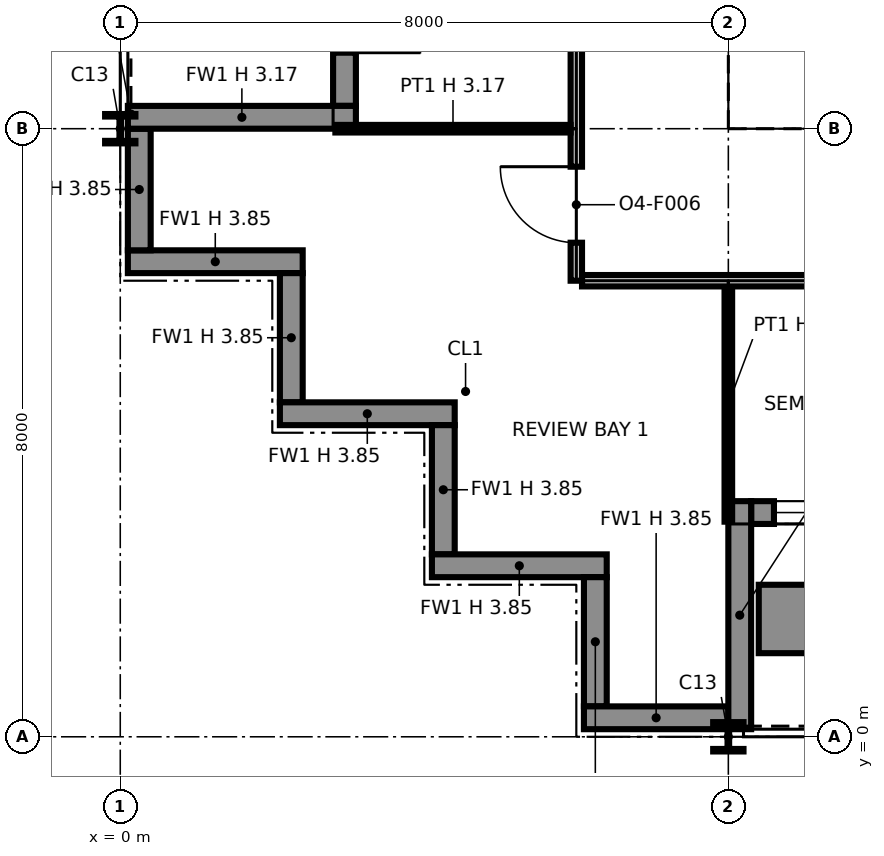
"""IFC4 building model, lengths in metres.
Left out: names, types, materials, properties, quantities, classifications, styles, units other than length and angle.
Written with IfcOpenShell. Run it as: python <this file> out.ifc"""

import sys

from ifc_helpers import new_model, si_unit, direction, frame, frame_2d, origin, origin_2d, place, context, subcontext, project, spatial, polyline, rectangle, i_section, outline, extrude, element, fill, save


model = new_model("IFC4")
c1 = context("Model", 3, precision=1e-05, world=origin(), true_north=direction((0.0, 1.0)))
c2 = subcontext(c1, "Body", "Model", "MODEL_VIEW")
j1 = project(units=[si_unit("LENGTHUNIT", "METRE"), si_unit("PLANEANGLEUNIT", "RADIAN")], contexts=[c1])
p1 = place(None, origin())
s1 = spatial("IfcSite", under=j1, at=p1, CompositionType="ELEMENT")
p2 = place(p1, origin())
s2 = spatial("IfcBuilding", under=s1, at=p2, CompositionType="ELEMENT")
p3 = place(p2, frame((0.0, 0.0, 217.0)))
s3 = spatial("IfcBuildingStorey", under=s2, at=p3, CompositionType="ELEMENT", Elevation=217.0)
for number, where, z_axis, x_axis in (
    (1, (0.0, 8.0, 0.0), (0.0, 0.0, 1.0), (1.0, 0.0, 0.0)),
    (2, (8.0, 0.0, 0.0), (0.0, 0.0, 1.0), (1.0, 0.0, 0.0)),
):
    element("IfcColumn", number, at=place(p3, frame(where, z_axis=z_axis, x_axis=x_axis)), inside=s3, PredefinedType="COLUMN", context=c2, shape_type="SweptSolid", body=[
        extrude(i_section(OverallWidth=0.399, OverallDepth=0.386, WebThickness=0.021, FlangeThickness=0.033, at=origin_2d()), origin(), (0.0, 0.0, 1.0), 3.85),
    ])
p4 = place(p3, frame((8.0, 8.0, 0.0), z_axis=(0.0, 0.0, 1.0), x_axis=(1.0, 0.0, 0.0)))
e3 = element("IfcColumn", 3, at=p4, inside=s3, PredefinedType="COLUMN", context=c2, shape_type="SweptSolid", body=[
    extrude(i_section(OverallWidth=0.373, OverallDepth=0.368, WebThickness=0.015, FlangeThickness=0.024, at=origin_2d()), origin(), (0.0, 0.0, 1.0), 3.85),
])
p5 = place(p3, frame((0.1, 6.25, 0.0), z_axis=(0.0, 0.0, 1.0), x_axis=(1.0, 0.0, 0.0)))
e4 = element("IfcWall", 4, at=p5, inside=s3, PredefinedType="SOLIDWALL", context=c2, shape_type="SweptSolid", body=[
    extrude(rectangle(XDim=2.3, YDim=0.3, at=frame_2d((1.15, 0.0))), origin(), (0.0, 0.0, 1.0), 3.85),
])
p6 = place(p3, frame((2.25, 6.1, 0.0), z_axis=(0.0, 0.0, 1.0), x_axis=(0.0, -1.0, 0.0)))
e5 = element("IfcWall", 5, at=p6, inside=s3, PredefinedType="SOLIDWALL", context=c2, shape_type="SweptSolid", body=[
    extrude(rectangle(XDim=1.7, YDim=0.3, at=frame_2d((0.85, 0.0))), origin(), (0.0, 0.0, 1.0), 3.85),
])
p7 = place(p3, frame((2.1, 4.25, 0.0), z_axis=(0.0, 0.0, 1.0), x_axis=(1.0, 0.0, 0.0)))
e6 = element("IfcWall", 6, at=p7, inside=s3, PredefinedType="SOLIDWALL", context=c2, shape_type="SweptSolid", body=[
    extrude(rectangle(XDim=2.3, YDim=0.3, at=frame_2d((1.15, 0.0))), origin(), (0.0, 0.0, 1.0), 3.85),
])
p8 = place(p3, frame((4.25, 4.1, 0.0), z_axis=(0.0, 0.0, 1.0), x_axis=(0.0, -1.0, 0.0)))
e7 = element("IfcWall", 7, at=p8, inside=s3, PredefinedType="SOLIDWALL", context=c2, shape_type="SweptSolid", body=[
    extrude(rectangle(XDim=1.7, YDim=0.3, at=frame_2d((0.85, 0.0))), origin(), (0.0, 0.0, 1.0), 3.85),
])
p9 = place(p3, frame((4.1, 2.25, 0.0), z_axis=(0.0, 0.0, 1.0), x_axis=(1.0, 0.0, 0.0)))
e8 = element("IfcWall", 8, at=p9, inside=s3, PredefinedType="SOLIDWALL", context=c2, shape_type="SweptSolid", body=[
    extrude(rectangle(XDim=2.3, YDim=0.3, at=frame_2d((1.15, 0.0))), origin(), (0.0, 0.0, 1.0), 3.85),
])
p10 = place(p3, frame((6.25, 2.1, 0.0), z_axis=(0.0, 0.0, 1.0), x_axis=(0.0, -1.0, 0.0)))
e9 = element("IfcWall", 9, at=p10, inside=s3, PredefinedType="SOLIDWALL", context=c2, shape_type="SweptSolid", body=[
    extrude(rectangle(XDim=1.7, YDim=0.3, at=frame_2d((0.85, 0.0))), origin(), (0.0, 0.0, 1.0), 3.85),
])
p11 = place(p3, frame((6.1, 0.25, 0.0), z_axis=(0.0, 0.0, 1.0), x_axis=(1.0, 0.0, 0.0)))
e10 = element("IfcWall", 10, at=p11, inside=s3, PredefinedType="SOLIDWALL", context=c2, shape_type="SweptSolid", body=[
    extrude(rectangle(XDim=1.9, YDim=0.3, at=frame_2d((0.95, 0.0))), origin(), (0.0, 0.0, 1.0), 3.85),
])
p12 = place(p3, frame((8.3, 2.95, 0.0), z_axis=(0.0, 0.0, 1.0), x_axis=(1.0, 0.0, 0.0)))
e11 = element("IfcWall", 11, at=p12, inside=s3, PredefinedType="SOLIDWALL", context=c2, shape_type="SweptSolid", body=[
    extrude(rectangle(XDim=7.4, YDim=0.3, at=frame_2d((3.7, 0.0))), origin(), (0.0, 0.0, 1.0), 3.85),
])
p13 = place(p12, frame((0.3, 0.0, 0.9)))
e12 = element("IfcOpeningElement", 12, at=p13, cuts=e11, PredefinedType="OPENING", context=c2, shape_type="SweptSolid", body=[
    extrude(rectangle(XDim=2.8, YDim=2.2, at=frame_2d((1.4, 1.1))), frame((0.0, 0.16, 0.0), z_axis=(0.0, -1.0, 0.0), x_axis=(1.0, 0.0, 0.0)), (0.0, 0.0, 1.0), 0.32),
])
p14 = place(p12, frame((4.7, 0.0, 0.0)))
e13 = element("IfcOpeningElement", 13, at=p14, cuts=e11, PredefinedType="OPENING", context=c2, shape_type="SweptSolid", body=[
    extrude(rectangle(XDim=2.0, YDim=2.4, at=frame_2d((1.0, 1.2))), frame((0.0, 0.16, 0.0), z_axis=(0.0, -1.0, 0.0), x_axis=(1.0, 0.0, 0.0)), (0.0, 0.0, 1.0), 0.32),
])
p15 = place(p3, frame((8.15, 0.1, 0.0), z_axis=(0.0, 0.0, 1.0), x_axis=(0.0, 1.0, 0.0)))
e14 = element("IfcWall", 14, at=p15, inside=s3, PredefinedType="SOLIDWALL", context=c2, shape_type="SweptSolid", body=[
    extrude(rectangle(XDim=3.0, YDim=0.3, at=frame_2d((1.5, 0.0))), origin(), (0.0, 0.0, 1.0), 3.171),
])
p16 = place(p3, frame((8.4, 1.55, 0.0), z_axis=(0.0, 0.0, 1.0), x_axis=(1.0, 0.0, 0.0)))
e15 = element("IfcWall", 15, at=p16, inside=s3, PredefinedType="SOLIDWALL", context=c2, shape_type="SweptSolid", body=[
    extrude(rectangle(XDim=3.2, YDim=0.9, at=frame_2d((1.6, 0.0))), origin(), (0.0, 0.0, 1.0), 0.6),
])
p17 = place(p3, frame((2.95, 15.7, 0.0), z_axis=(0.0, 0.0, 1.0), x_axis=(0.0, -1.0, 0.0)))
e16 = element("IfcWall", 16, at=p17, inside=s3, PredefinedType="SOLIDWALL", context=c2, shape_type="SweptSolid", body=[
    extrude(rectangle(XDim=7.4, YDim=0.3, at=frame_2d((3.7, 0.0))), origin(), (0.0, 0.0, 1.0), 3.85),
])
p18 = place(p17, frame((0.3, 0.0, 0.9)))
e17 = element("IfcOpeningElement", 17, at=p18, cuts=e16, PredefinedType="OPENING", context=c2, shape_type="SweptSolid", body=[
    extrude(rectangle(XDim=2.8, YDim=2.2, at=frame_2d((1.4, 1.1))), frame((0.0, 0.16, 0.0), z_axis=(0.0, -1.0, 0.0), x_axis=(1.0, 0.0, 0.0)), (0.0, 0.0, 1.0), 0.32),
])
p19 = place(p17, frame((4.7, 0.0, 0.0)))
e18 = element("IfcOpeningElement", 18, at=p19, cuts=e16, PredefinedType="OPENING", context=c2, shape_type="SweptSolid", body=[
    extrude(rectangle(XDim=2.0, YDim=2.4, at=frame_2d((1.0, 1.2))), frame((0.0, 0.16, 0.0), z_axis=(0.0, -1.0, 0.0), x_axis=(1.0, 0.0, 0.0)), (0.0, 0.0, 1.0), 0.32),
])
p20 = place(p3, frame((0.1, 8.15, 0.0), z_axis=(0.0, 0.0, 1.0), x_axis=(1.0, 0.0, 0.0)))
e19 = element("IfcWall", 19, at=p20, inside=s3, PredefinedType="SOLIDWALL", context=c2, shape_type="SweptSolid", body=[
    extrude(rectangle(XDim=3.0, YDim=0.3, at=frame_2d((1.5, 0.0))), origin(), (0.0, 0.0, 1.0), 3.171),
])
p21 = place(p3, frame((0.25, 8.0, 0.0), z_axis=(0.0, 0.0, 1.0), x_axis=(0.0, -1.0, 0.0)))
e20 = element("IfcWall", 20, at=p21, inside=s3, PredefinedType="SOLIDWALL", context=c2, shape_type="SweptSolid", body=[
    extrude(rectangle(XDim=1.6, YDim=0.3, at=frame_2d((0.8, 0.0))), origin(), (0.0, 0.0, 1.0), 3.85),
])
p22 = place(p3, frame((8.65, 8.75, 0.0), z_axis=(0.0, 0.0, 1.0), x_axis=(1.0, 0.0, 0.0)))
e21 = element("IfcWall", 21, at=p22, inside=s3, PredefinedType="PARTITIONING", context=c2, shape_type="SweptSolid", body=[
    extrude(outline(polyline([(0.0, 0.0), (14.7, 0.0), (14.7, 3.85), (7.438, 3.85), (7.438, 3.308), (7.262, 3.308), (7.261, 3.85), (0.0, 3.85), (0.0, 0.0)])), frame((0.0, 0.1, 0.0), z_axis=(0.0, -1.0, 0.0), x_axis=(1.0, 0.0, 0.0)), (0.0, 0.0, 1.0), 0.2),
])
p23 = place(p22, frame((1.3, 0.0, 0.0)))
e22 = element("IfcOpeningElement", 22, at=p23, cuts=e21, PredefinedType="OPENING", context=c2, shape_type="SweptSolid", body=[
    extrude(rectangle(XDim=1.4, YDim=2.1, at=frame_2d((0.7, 1.05))), frame((0.0, 0.11, 0.0), z_axis=(0.0, -1.0, 0.0), x_axis=(1.0, 0.0, 0.0)), (0.0, 0.0, 1.0), 0.22),
])
p24 = place(p22, frame((4.6, 0.0, 0.0)))
e23 = element("IfcOpeningElement", 23, at=p24, cuts=e21, PredefinedType="OPENING", context=c2, shape_type="SweptSolid", body=[
    extrude(rectangle(XDim=1.4, YDim=2.1, at=frame_2d((0.7, 1.05))), frame((0.0, 0.11, 0.0), z_axis=(0.0, -1.0, 0.0), x_axis=(1.0, 0.0, 0.0)), (0.0, 0.0, 1.0), 0.22),
])
p25 = place(p22, frame((10.4, 0.0, 0.0)))
e24 = element("IfcOpeningElement", 24, at=p25, cuts=e21, PredefinedType="OPENING", context=c2, shape_type="SweptSolid", body=[
    extrude(rectangle(XDim=1.2, YDim=2.1, at=frame_2d((0.6, 1.05))), frame((0.0, 0.11, 0.0), z_axis=(0.0, -1.0, 0.0), x_axis=(1.0, 0.0, 0.0)), (0.0, 0.0, 1.0), 0.22),
])
p26 = place(p3, frame((8.75, 8.85, 0.0), z_axis=(0.0, 0.0, 1.0), x_axis=(0.0, 1.0, 0.0)))
e25 = element("IfcWall", 25, at=p26, inside=s3, PredefinedType="PARTITIONING", context=c2, shape_type="SweptSolid", body=[
    extrude(outline(polyline([(0.0, 0.0), (14.3, 0.0), (14.3, 3.85), (10.225, 3.85), (10.224, 3.44), (10.076, 3.44), (10.075, 3.85), (7.239, 3.85), (7.238, 3.308), (7.062, 3.308), (7.062, 3.85), (0.0, 3.85), (0.0, 0.0)])), frame((0.0, 0.1, 0.0), z_axis=(0.0, -1.0, 0.0), x_axis=(1.0, 0.0, 0.0)), (0.0, 0.0, 1.0), 0.2),
])
p27 = place(p26, frame((8.3, 0.0, 0.0)))
e26 = element("IfcOpeningElement", 26, at=p27, cuts=e25, PredefinedType="OPENING", context=c2, shape_type="SweptSolid", body=[
    extrude(rectangle(XDim=1.8, YDim=2.1, at=frame_2d((0.9, 1.05))), frame((0.0, 0.11, 0.0), z_axis=(0.0, -1.0, 0.0), x_axis=(1.0, 0.0, 0.0)), (0.0, 0.0, 1.0), 0.22),
])
p28 = place(p3, frame((8.0, 2.83, 0.0), z_axis=(0.0, 0.0, 1.0), x_axis=(0.0, 1.0, 0.0)))
e27 = element("IfcWall", 27, at=p28, inside=s3, PredefinedType="PARTITIONING", context=c2, shape_type="SweptSolid", body=[
    extrude(rectangle(XDim=3.095, YDim=0.1, at=frame_2d((1.547, 0.0))), origin(), (0.0, 0.0, 1.0), 3.172),
])
p29 = place(p3, frame((6.075, 6.0, 0.0), z_axis=(0.0, 0.0, 1.0), x_axis=(1.0, 0.0, 0.0)))
e28 = element("IfcWall", 28, at=p29, inside=s3, PredefinedType="PARTITIONING", context=c2, shape_type="SweptSolid", body=[
    extrude(rectangle(XDim=35.85, YDim=0.15, at=frame_2d((17.925, 0.0))), origin(), (0.0, 0.0, 1.0), 3.85),
])
p30 = place(p29, frame((12.425, 0.0, 0.0), z_axis=(0.0, 0.0, 1.0), x_axis=(-1.0, 0.0, 0.0)))
e29 = element("IfcOpeningElement", 29, at=p30, cuts=e28, PredefinedType="OPENING", context=c2, shape_type="SweptSolid", body=[
    extrude(rectangle(XDim=1.0, YDim=2.1, at=frame_2d((0.5, 1.05))), frame((0.0, 0.085, 0.0), z_axis=(0.0, -1.0, 0.0), x_axis=(1.0, 0.0, 0.0)), (0.0, 0.0, 1.0), 0.17),
])
p31 = place(p29, frame((16.425, 0.0, 0.0), z_axis=(0.0, 0.0, 1.0), x_axis=(-1.0, 0.0, 0.0)))
e30 = element("IfcOpeningElement", 30, at=p31, cuts=e28, PredefinedType="OPENING", context=c2, shape_type="SweptSolid", body=[
    extrude(rectangle(XDim=1.0, YDim=2.1, at=frame_2d((0.5, 1.05))), frame((0.0, 0.085, 0.0), z_axis=(0.0, -1.0, 0.0), x_axis=(1.0, 0.0, 0.0)), (0.0, 0.0, 1.0), 0.17),
])
p32 = place(p29, frame((30.425, 0.0, 0.0), z_axis=(0.0, 0.0, 1.0), x_axis=(-1.0, 0.0, 0.0)))
e31 = element("IfcOpeningElement", 31, at=p32, cuts=e28, PredefinedType="OPENING", context=c2, shape_type="SweptSolid", body=[
    extrude(rectangle(XDim=1.0, YDim=2.1, at=frame_2d((0.5, 1.05))), frame((0.0, 0.085, 0.0), z_axis=(0.0, -1.0, 0.0), x_axis=(1.0, 0.0, 0.0)), (0.0, 0.0, 1.0), 0.17),
])
p33 = place(p29, frame((6.425, 0.0, 0.0), z_axis=(0.0, 0.0, 1.0), x_axis=(-1.0, 0.0, 0.0)))
e32 = element("IfcOpeningElement", 32, at=p33, cuts=e28, PredefinedType="OPENING", context=c2, shape_type="SweptSolid", body=[
    extrude(rectangle(XDim=1.0, YDim=2.1, at=frame_2d((0.5, 1.05))), frame((0.0, 0.085, 0.0), z_axis=(0.0, -1.0, 0.0), x_axis=(1.0, 0.0, 0.0)), (0.0, 0.0, 1.0), 0.17),
])
p34 = place(p29, frame((23.425, 0.0, 0.0), z_axis=(0.0, 0.0, 1.0), x_axis=(-1.0, 0.0, 0.0)))
e33 = element("IfcOpeningElement", 33, at=p34, cuts=e28, PredefinedType="OPENING", context=c2, shape_type="SweptSolid", body=[
    extrude(rectangle(XDim=1.0, YDim=2.1, at=frame_2d((0.5, 1.05))), frame((0.0, 0.085, 0.0), z_axis=(0.0, -1.0, 0.0), x_axis=(1.0, 0.0, 0.0)), (0.0, 0.0, 1.0), 0.17),
])
p35 = place(p29, frame((35.425, 0.0, 0.0), z_axis=(0.0, 0.0, 1.0), x_axis=(-1.0, 0.0, 0.0)))
e34 = element("IfcOpeningElement", 34, at=p35, cuts=e28, PredefinedType="OPENING", context=c2, shape_type="SweptSolid", body=[
    extrude(rectangle(XDim=1.0, YDim=2.1, at=frame_2d((0.5, 1.05))), frame((0.0, 0.085, 0.0), z_axis=(0.0, -1.0, 0.0), x_axis=(1.0, 0.0, 0.0)), (0.0, 0.0, 1.0), 0.17),
])
p36 = place(p3, frame((6.0, 6.0, 0.0), z_axis=(0.0, 0.0, 1.0), x_axis=(0.0, 1.0, 0.0)))
e35 = element("IfcWall", 35, at=p36, inside=s3, PredefinedType="PARTITIONING", context=c2, shape_type="SweptSolid", body=[
    extrude(outline(polyline([(0.0, 0.0), (13.375, 0.0), (13.375, 3.85), (10.3, 3.85), (10.298, 3.172), (9.702, 3.172), (9.7, 3.85), (6.3, 3.85), (6.298, 3.172), (5.702, 3.172), (5.7, 3.85), (2.3, 3.85), (2.298, 3.172), (1.702, 3.172), (1.7, 3.85), (0.0, 3.85), (0.0, 0.0)])), frame((0.0, 0.075, 0.0), z_axis=(0.0, -1.0, 0.0), x_axis=(1.0, 0.0, 0.0)), (0.0, 0.0, 1.0), 0.15),
])
p37 = place(p36, frame((0.5, 0.0, 0.0)))
e36 = element("IfcOpeningElement", 36, at=p37, cuts=e35, PredefinedType="OPENING", context=c2, shape_type="SweptSolid", body=[
    extrude(rectangle(XDim=1.0, YDim=2.1, at=frame_2d((0.5, 1.05))), frame((0.0, 0.085, 0.0), z_axis=(0.0, -1.0, 0.0), x_axis=(1.0, 0.0, 0.0)), (0.0, 0.0, 1.0), 0.17),
])
p38 = place(p36, frame((3.5, 0.0, 0.0)))
e37 = element("IfcOpeningElement", 37, at=p38, cuts=e35, PredefinedType="OPENING", context=c2, shape_type="SweptSolid", body=[
    extrude(rectangle(XDim=1.0, YDim=2.1, at=frame_2d((0.5, 1.05))), frame((0.0, 0.085, 0.0), z_axis=(0.0, -1.0, 0.0), x_axis=(1.0, 0.0, 0.0)), (0.0, 0.0, 1.0), 0.17),
])
p39 = place(p36, frame((7.5, 0.0, 0.0)))
e38 = element("IfcOpeningElement", 38, at=p39, cuts=e35, PredefinedType="OPENING", context=c2, shape_type="SweptSolid", body=[
    extrude(rectangle(XDim=1.0, YDim=2.1, at=frame_2d((0.5, 1.05))), frame((0.0, 0.085, 0.0), z_axis=(0.0, -1.0, 0.0), x_axis=(1.0, 0.0, 0.0)), (0.0, 0.0, 1.0), 0.17),
])
p40 = place(p36, frame((11.225, 0.0, 0.0)))
e39 = element("IfcOpeningElement", 39, at=p40, cuts=e35, PredefinedType="OPENING", context=c2, shape_type="SweptSolid", body=[
    extrude(rectangle(XDim=1.0, YDim=2.1, at=frame_2d((0.5, 1.05))), frame((0.0, 0.085, 0.0), z_axis=(0.0, -1.0, 0.0), x_axis=(1.0, 0.0, 0.0)), (0.0, 0.0, 1.0), 0.17),
])
p41 = place(p3, frame((2.83, 8.0, 0.0), z_axis=(0.0, 0.0, 1.0), x_axis=(1.0, 0.0, 0.0)))
e40 = element("IfcWall", 40, at=p41, inside=s3, PredefinedType="PARTITIONING", context=c2, shape_type="SweptSolid", body=[
    extrude(rectangle(XDim=3.095, YDim=0.1, at=frame_2d((1.547, 0.0))), origin(), (0.0, 0.0, 1.0), 3.172),
])
p42 = place(p13, origin())
e41 = element("IfcWindow", 41, at=p42, inside=s3, PartitioningType="SINGLE_PANEL", PredefinedType="WINDOW", context=c2, shape_type="SweptSolid", body=[
    extrude(rectangle(XDim=2.8, YDim=2.2, at=frame_2d((1.4, 1.1))), frame((0.0, 0.03, 0.0), z_axis=(0.0, -1.0, 0.0), x_axis=(1.0, 0.0, 0.0)), (0.0, 0.0, 1.0), 0.06),
])
fill(e12, e41)
p43 = place(p37, origin())
e42 = element("IfcDoor", 42, at=p43, inside=s3, OperationType="SINGLE_SWING_RIGHT", PredefinedType="DOOR", context=c2, shape_type="SweptSolid", body=[
    extrude(rectangle(XDim=1.0, YDim=2.1, at=frame_2d((0.5, 1.05))), frame((0.0, 0.025, 0.0), z_axis=(0.0, -1.0, 0.0), x_axis=(1.0, 0.0, 0.0)), (0.0, 0.0, 1.0), 0.05),
])
fill(e36, e42)
save(model, sys.argv[1])
